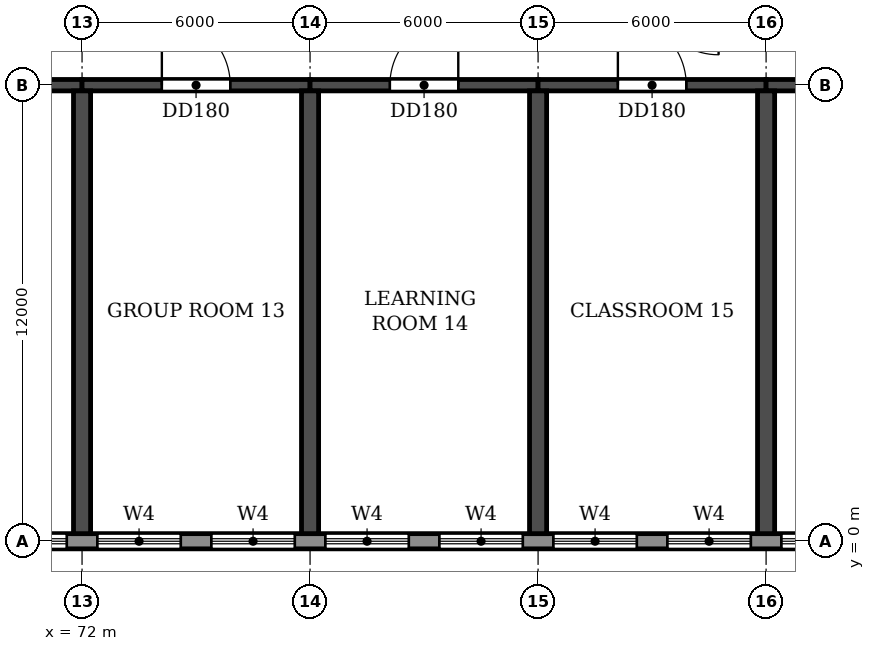
"""IFC4 building model, lengths in metres.
Left out: names, types, materials, properties, quantities, classifications, styles, units other than length and angle.
Written with IfcOpenShell. Run it as: python <this file> out.ifc"""

import sys

from ifc_helpers import new_model, si_unit, direction, frame, frame_2d, origin, place, context, subcontext, project, spatial, rectangle, extrude, element, fill, save


model = new_model("IFC4")
c1 = context("Model", 3, precision=1e-05, world=origin(), true_north=direction((0.0, 1.0)))
c2 = subcontext(c1, "Body", "Model", "MODEL_VIEW")
j1 = project(units=[si_unit("LENGTHUNIT", "METRE"), si_unit("PLANEANGLEUNIT", "RADIAN")], contexts=[c1])
p1 = place(None, origin())
s1 = spatial("IfcSite", under=j1, at=p1, CompositionType="ELEMENT")
p2 = place(p1, origin())
s2 = spatial("IfcBuilding", under=s1, at=p2, CompositionType="ELEMENT")
p3 = place(p2, frame((0.0, 0.0, 15.0)))
s3 = spatial("IfcBuildingStorey", under=s2, at=p3, CompositionType="ELEMENT", Elevation=15.0)
for number, where, z_axis, x_axis in (
    (1, (72.0, 0.2, 0.0), (0.0, 0.0, 1.0), (0.0, 1.0, 0.0)),
    (2, (78.0, 0.2, 0.0), (0.0, 0.0, 1.0), (0.0, 1.0, 0.0)),
    (3, (84.0, 0.2, 0.0), (0.0, 0.0, 1.0), (0.0, 1.0, 0.0)),
    (4, (90.0, 0.2, 0.0), (0.0, 0.0, 1.0), (0.0, 1.0, 0.0)),
):
    element("IfcWall", number, at=place(p3, frame(where, z_axis=z_axis, x_axis=x_axis)), inside=s3, PredefinedType="SHEAR", context=c2, shape_type="SweptSolid", body=[
        extrude(rectangle(XDim=11.65, YDim=0.45, at=frame_2d((5.825, 0.0))), origin(), (0.0, 0.0, 1.0), 3.92),
    ])
p4 = place(p3, frame((66.0, 12.0, 0.0), z_axis=(0.0, 0.0, 1.0), x_axis=(1.0, 0.0, 0.0)))
e5 = element("IfcWall", 5, at=p4, inside=s3, PredefinedType="SHEAR", context=c2, shape_type="SweptSolid", body=[
    extrude(rectangle(XDim=6.0, YDim=0.3, at=frame_2d((3.0, 0.0))), origin(), (0.0, 0.0, 1.0), 3.32),
])
p5 = place(p4, frame((2.1, 0.0, 0.0)))
e6 = element("IfcOpeningElement", 6, at=p5, cuts=e5, PredefinedType="OPENING", context=c2, shape_type="SweptSolid", body=[
    extrude(rectangle(XDim=1.8, YDim=2.1, at=frame_2d((0.9, 1.05))), frame((0.0, 0.16, 0.0), z_axis=(0.0, -1.0, 0.0), x_axis=(1.0, 0.0, 0.0)), (0.0, 0.0, 1.0), 0.32),
])
p6 = place(p3, frame((72.0, 12.0, 0.0), z_axis=(0.0, 0.0, 1.0), x_axis=(1.0, 0.0, 0.0)))
e7 = element("IfcWall", 7, at=p6, inside=s3, PredefinedType="SHEAR", context=c2, shape_type="SweptSolid", body=[
    extrude(rectangle(XDim=6.0, YDim=0.3, at=frame_2d((3.0, 0.0))), origin(), (0.0, 0.0, 1.0), 3.32),
])
p7 = place(p6, frame((2.1, 0.0, 0.0)))
e8 = element("IfcOpeningElement", 8, at=p7, cuts=e7, PredefinedType="OPENING", context=c2, shape_type="SweptSolid", body=[
    extrude(rectangle(XDim=1.8, YDim=2.1, at=frame_2d((0.9, 1.05))), frame((0.0, 0.16, 0.0), z_axis=(0.0, -1.0, 0.0), x_axis=(1.0, 0.0, 0.0)), (0.0, 0.0, 1.0), 0.32),
])
p8 = place(p3, frame((78.0, 12.0, 0.0), z_axis=(0.0, 0.0, 1.0), x_axis=(1.0, 0.0, 0.0)))
e9 = element("IfcWall", 9, at=p8, inside=s3, PredefinedType="SHEAR", context=c2, shape_type="SweptSolid", body=[
    extrude(rectangle(XDim=6.0, YDim=0.3, at=frame_2d((3.0, 0.0))), origin(), (0.0, 0.0, 1.0), 3.32),
])
p9 = place(p8, frame((2.1, 0.0, 0.0)))
e10 = element("IfcOpeningElement", 10, at=p9, cuts=e9, PredefinedType="OPENING", context=c2, shape_type="SweptSolid", body=[
    extrude(rectangle(XDim=1.8, YDim=2.1, at=frame_2d((0.9, 1.05))), frame((0.0, 0.16, 0.0), z_axis=(0.0, -1.0, 0.0), x_axis=(1.0, 0.0, 0.0)), (0.0, 0.0, 1.0), 0.32),
])
p10 = place(p3, frame((84.0, 12.0, 0.0), z_axis=(0.0, 0.0, 1.0), x_axis=(1.0, 0.0, 0.0)))
e11 = element("IfcWall", 11, at=p10, inside=s3, PredefinedType="SHEAR", context=c2, shape_type="SweptSolid", body=[
    extrude(rectangle(XDim=6.0, YDim=0.3, at=frame_2d((3.0, 0.0))), origin(), (0.0, 0.0, 1.0), 3.32),
])
p11 = place(p10, frame((2.1, 0.0, 0.0)))
e12 = element("IfcOpeningElement", 12, at=p11, cuts=e11, PredefinedType="OPENING", context=c2, shape_type="SweptSolid", body=[
    extrude(rectangle(XDim=1.8, YDim=2.1, at=frame_2d((0.9, 1.05))), frame((0.0, 0.16, 0.0), z_axis=(0.0, -1.0, 0.0), x_axis=(1.0, 0.0, 0.0)), (0.0, 0.0, 1.0), 0.32),
])
p12 = place(p3, frame((90.0, 12.0, 0.0), z_axis=(0.0, 0.0, 1.0), x_axis=(1.0, 0.0, 0.0)))
e13 = element("IfcWall", 13, at=p12, inside=s3, PredefinedType="SHEAR", context=c2, shape_type="SweptSolid", body=[
    extrude(rectangle(XDim=6.0, YDim=0.3, at=frame_2d((3.0, 0.0))), origin(), (0.0, 0.0, 1.0), 3.32),
])
p13 = place(p12, frame((2.1, 0.0, 0.0)))
e14 = element("IfcOpeningElement", 14, at=p13, cuts=e13, PredefinedType="OPENING", context=c2, shape_type="SweptSolid", body=[
    extrude(rectangle(XDim=1.8, YDim=2.1, at=frame_2d((0.9, 1.05))), frame((0.0, 0.16, 0.0), z_axis=(0.0, -1.0, 0.0), x_axis=(1.0, 0.0, 0.0)), (0.0, 0.0, 1.0), 0.32),
])
p14 = place(p3, frame((-3.0, 0.0, 0.0), z_axis=(0.0, 0.0, 1.0), x_axis=(1.0, 0.0, 0.0)))
e15 = element("IfcWall", 15, at=p14, inside=s3, PredefinedType="STANDARD", context=c2, shape_type="SweptSolid", body=[
    extrude(rectangle(XDim=108.0, YDim=0.4, at=frame_2d((54.0, 0.0))), origin(), (0.0, 0.0, 1.0), 3.92),
])
p15 = place(p14, frame((3.4, 0.0, 0.9)))
e16 = element("IfcOpeningElement", 16, at=p15, cuts=e15, PredefinedType="OPENING", context=c2, shape_type="SweptSolid", body=[
    extrude(rectangle(XDim=2.2, YDim=2.7, at=frame_2d((1.1, 1.35))), frame((0.0, 0.21, 0.0), z_axis=(0.0, -1.0, 0.0), x_axis=(1.0, 0.0, 0.0)), (0.0, 0.0, 1.0), 0.42),
])
p16 = place(p14, frame((6.4, 0.0, 0.9)))
e17 = element("IfcOpeningElement", 17, at=p16, cuts=e15, PredefinedType="OPENING", context=c2, shape_type="SweptSolid", body=[
    extrude(rectangle(XDim=2.2, YDim=2.7, at=frame_2d((1.1, 1.35))), frame((0.0, 0.21, 0.0), z_axis=(0.0, -1.0, 0.0), x_axis=(1.0, 0.0, 0.0)), (0.0, 0.0, 1.0), 0.42),
])
p17 = place(p14, frame((9.4, 0.0, 0.9)))
e18 = element("IfcOpeningElement", 18, at=p17, cuts=e15, PredefinedType="OPENING", context=c2, shape_type="SweptSolid", body=[
    extrude(rectangle(XDim=2.2, YDim=2.7, at=frame_2d((1.1, 1.35))), frame((0.0, 0.21, 0.0), z_axis=(0.0, -1.0, 0.0), x_axis=(1.0, 0.0, 0.0)), (0.0, 0.0, 1.0), 0.42),
])
p18 = place(p14, frame((12.4, 0.0, 0.9)))
e19 = element("IfcOpeningElement", 19, at=p18, cuts=e15, PredefinedType="OPENING", context=c2, shape_type="SweptSolid", body=[
    extrude(rectangle(XDim=2.2, YDim=2.7, at=frame_2d((1.1, 1.35))), frame((0.0, 0.21, 0.0), z_axis=(0.0, -1.0, 0.0), x_axis=(1.0, 0.0, 0.0)), (0.0, 0.0, 1.0), 0.42),
])
p19 = place(p14, frame((15.4, 0.0, 0.9)))
e20 = element("IfcOpeningElement", 20, at=p19, cuts=e15, PredefinedType="OPENING", context=c2, shape_type="SweptSolid", body=[
    extrude(rectangle(XDim=2.2, YDim=2.7, at=frame_2d((1.1, 1.35))), frame((0.0, 0.21, 0.0), z_axis=(0.0, -1.0, 0.0), x_axis=(1.0, 0.0, 0.0)), (0.0, 0.0, 1.0), 0.42),
])
p20 = place(p14, frame((18.4, 0.0, 0.9)))
e21 = element("IfcOpeningElement", 21, at=p20, cuts=e15, PredefinedType="OPENING", context=c2, shape_type="SweptSolid", body=[
    extrude(rectangle(XDim=2.2, YDim=2.7, at=frame_2d((1.1, 1.35))), frame((0.0, 0.21, 0.0), z_axis=(0.0, -1.0, 0.0), x_axis=(1.0, 0.0, 0.0)), (0.0, 0.0, 1.0), 0.42),
])
p21 = place(p14, frame((21.4, 0.0, 0.9)))
e22 = element("IfcOpeningElement", 22, at=p21, cuts=e15, PredefinedType="OPENING", context=c2, shape_type="SweptSolid", body=[
    extrude(rectangle(XDim=2.2, YDim=2.7, at=frame_2d((1.1, 1.35))), frame((0.0, 0.21, 0.0), z_axis=(0.0, -1.0, 0.0), x_axis=(1.0, 0.0, 0.0)), (0.0, 0.0, 1.0), 0.42),
])
p22 = place(p14, frame((24.4, 0.0, 0.9)))
e23 = element("IfcOpeningElement", 23, at=p22, cuts=e15, PredefinedType="OPENING", context=c2, shape_type="SweptSolid", body=[
    extrude(rectangle(XDim=2.2, YDim=2.7, at=frame_2d((1.1, 1.35))), frame((0.0, 0.21, 0.0), z_axis=(0.0, -1.0, 0.0), x_axis=(1.0, 0.0, 0.0)), (0.0, 0.0, 1.0), 0.42),
])
p23 = place(p14, frame((27.4, 0.0, 0.9)))
e24 = element("IfcOpeningElement", 24, at=p23, cuts=e15, PredefinedType="OPENING", context=c2, shape_type="SweptSolid", body=[
    extrude(rectangle(XDim=2.2, YDim=2.7, at=frame_2d((1.1, 1.35))), frame((0.0, 0.21, 0.0), z_axis=(0.0, -1.0, 0.0), x_axis=(1.0, 0.0, 0.0)), (0.0, 0.0, 1.0), 0.42),
])
p24 = place(p14, frame((30.4, 0.0, 0.9)))
e25 = element("IfcOpeningElement", 25, at=p24, cuts=e15, PredefinedType="OPENING", context=c2, shape_type="SweptSolid", body=[
    extrude(rectangle(XDim=2.2, YDim=2.7, at=frame_2d((1.1, 1.35))), frame((0.0, 0.21, 0.0), z_axis=(0.0, -1.0, 0.0), x_axis=(1.0, 0.0, 0.0)), (0.0, 0.0, 1.0), 0.42),
])
p25 = place(p14, frame((33.4, 0.0, 0.9)))
e26 = element("IfcOpeningElement", 26, at=p25, cuts=e15, PredefinedType="OPENING", context=c2, shape_type="SweptSolid", body=[
    extrude(rectangle(XDim=2.2, YDim=2.7, at=frame_2d((1.1, 1.35))), frame((0.0, 0.21, 0.0), z_axis=(0.0, -1.0, 0.0), x_axis=(1.0, 0.0, 0.0)), (0.0, 0.0, 1.0), 0.42),
])
p26 = place(p14, frame((36.4, 0.0, 0.9)))
e27 = element("IfcOpeningElement", 27, at=p26, cuts=e15, PredefinedType="OPENING", context=c2, shape_type="SweptSolid", body=[
    extrude(rectangle(XDim=2.2, YDim=2.7, at=frame_2d((1.1, 1.35))), frame((0.0, 0.21, 0.0), z_axis=(0.0, -1.0, 0.0), x_axis=(1.0, 0.0, 0.0)), (0.0, 0.0, 1.0), 0.42),
])
p27 = place(p14, frame((39.4, 0.0, 0.9)))
e28 = element("IfcOpeningElement", 28, at=p27, cuts=e15, PredefinedType="OPENING", context=c2, shape_type="SweptSolid", body=[
    extrude(rectangle(XDim=2.2, YDim=2.7, at=frame_2d((1.1, 1.35))), frame((0.0, 0.21, 0.0), z_axis=(0.0, -1.0, 0.0), x_axis=(1.0, 0.0, 0.0)), (0.0, 0.0, 1.0), 0.42),
])
p28 = place(p14, frame((42.4, 0.0, 0.9)))
e29 = element("IfcOpeningElement", 29, at=p28, cuts=e15, PredefinedType="OPENING", context=c2, shape_type="SweptSolid", body=[
    extrude(rectangle(XDim=2.2, YDim=2.7, at=frame_2d((1.1, 1.35))), frame((0.0, 0.21, 0.0), z_axis=(0.0, -1.0, 0.0), x_axis=(1.0, 0.0, 0.0)), (0.0, 0.0, 1.0), 0.42),
])
p29 = place(p14, frame((45.4, 0.0, 0.9)))
e30 = element("IfcOpeningElement", 30, at=p29, cuts=e15, PredefinedType="OPENING", context=c2, shape_type="SweptSolid", body=[
    extrude(rectangle(XDim=2.2, YDim=2.7, at=frame_2d((1.1, 1.35))), frame((0.0, 0.21, 0.0), z_axis=(0.0, -1.0, 0.0), x_axis=(1.0, 0.0, 0.0)), (0.0, 0.0, 1.0), 0.42),
])
p30 = place(p14, frame((48.4, 0.0, 0.9)))
e31 = element("IfcOpeningElement", 31, at=p30, cuts=e15, PredefinedType="OPENING", context=c2, shape_type="SweptSolid", body=[
    extrude(rectangle(XDim=2.2, YDim=2.7, at=frame_2d((1.1, 1.35))), frame((0.0, 0.21, 0.0), z_axis=(0.0, -1.0, 0.0), x_axis=(1.0, 0.0, 0.0)), (0.0, 0.0, 1.0), 0.42),
])
p31 = place(p14, frame((51.4, 0.0, 0.9)))
e32 = element("IfcOpeningElement", 32, at=p31, cuts=e15, PredefinedType="OPENING", context=c2, shape_type="SweptSolid", body=[
    extrude(rectangle(XDim=2.2, YDim=2.7, at=frame_2d((1.1, 1.35))), frame((0.0, 0.21, 0.0), z_axis=(0.0, -1.0, 0.0), x_axis=(1.0, 0.0, 0.0)), (0.0, 0.0, 1.0), 0.42),
])
p32 = place(p14, frame((54.4, 0.0, 0.9)))
e33 = element("IfcOpeningElement", 33, at=p32, cuts=e15, PredefinedType="OPENING", context=c2, shape_type="SweptSolid", body=[
    extrude(rectangle(XDim=2.2, YDim=2.7, at=frame_2d((1.1, 1.35))), frame((0.0, 0.21, 0.0), z_axis=(0.0, -1.0, 0.0), x_axis=(1.0, 0.0, 0.0)), (0.0, 0.0, 1.0), 0.42),
])
p33 = place(p14, frame((57.4, 0.0, 0.9)))
e34 = element("IfcOpeningElement", 34, at=p33, cuts=e15, PredefinedType="OPENING", context=c2, shape_type="SweptSolid", body=[
    extrude(rectangle(XDim=2.2, YDim=2.7, at=frame_2d((1.1, 1.35))), frame((0.0, 0.21, 0.0), z_axis=(0.0, -1.0, 0.0), x_axis=(1.0, 0.0, 0.0)), (0.0, 0.0, 1.0), 0.42),
])
p34 = place(p14, frame((60.4, 0.0, 0.9)))
e35 = element("IfcOpeningElement", 35, at=p34, cuts=e15, PredefinedType="OPENING", context=c2, shape_type="SweptSolid", body=[
    extrude(rectangle(XDim=2.2, YDim=2.7, at=frame_2d((1.1, 1.35))), frame((0.0, 0.21, 0.0), z_axis=(0.0, -1.0, 0.0), x_axis=(1.0, 0.0, 0.0)), (0.0, 0.0, 1.0), 0.42),
])
p35 = place(p14, frame((63.4, 0.0, 0.9)))
e36 = element("IfcOpeningElement", 36, at=p35, cuts=e15, PredefinedType="OPENING", context=c2, shape_type="SweptSolid", body=[
    extrude(rectangle(XDim=2.2, YDim=2.7, at=frame_2d((1.1, 1.35))), frame((0.0, 0.21, 0.0), z_axis=(0.0, -1.0, 0.0), x_axis=(1.0, 0.0, 0.0)), (0.0, 0.0, 1.0), 0.42),
])
p36 = place(p14, frame((66.4, 0.0, 0.9)))
e37 = element("IfcOpeningElement", 37, at=p36, cuts=e15, PredefinedType="OPENING", context=c2, shape_type="SweptSolid", body=[
    extrude(rectangle(XDim=2.2, YDim=2.7, at=frame_2d((1.1, 1.35))), frame((0.0, 0.21, 0.0), z_axis=(0.0, -1.0, 0.0), x_axis=(1.0, 0.0, 0.0)), (0.0, 0.0, 1.0), 0.42),
])
p37 = place(p14, frame((69.4, 0.0, 0.9)))
e38 = element("IfcOpeningElement", 38, at=p37, cuts=e15, PredefinedType="OPENING", context=c2, shape_type="SweptSolid", body=[
    extrude(rectangle(XDim=2.2, YDim=2.7, at=frame_2d((1.1, 1.35))), frame((0.0, 0.21, 0.0), z_axis=(0.0, -1.0, 0.0), x_axis=(1.0, 0.0, 0.0)), (0.0, 0.0, 1.0), 0.42),
])
p38 = place(p14, frame((72.4, 0.0, 0.9)))
e39 = element("IfcOpeningElement", 39, at=p38, cuts=e15, PredefinedType="OPENING", context=c2, shape_type="SweptSolid", body=[
    extrude(rectangle(XDim=2.2, YDim=2.7, at=frame_2d((1.1, 1.35))), frame((0.0, 0.21, 0.0), z_axis=(0.0, -1.0, 0.0), x_axis=(1.0, 0.0, 0.0)), (0.0, 0.0, 1.0), 0.42),
])
p39 = place(p14, frame((75.4, 0.0, 0.9)))
e40 = element("IfcOpeningElement", 40, at=p39, cuts=e15, PredefinedType="OPENING", context=c2, shape_type="SweptSolid", body=[
    extrude(rectangle(XDim=2.2, YDim=2.7, at=frame_2d((1.1, 1.35))), frame((0.0, 0.21, 0.0), z_axis=(0.0, -1.0, 0.0), x_axis=(1.0, 0.0, 0.0)), (0.0, 0.0, 1.0), 0.42),
])
p40 = place(p14, frame((78.4, 0.0, 0.9)))
e41 = element("IfcOpeningElement", 41, at=p40, cuts=e15, PredefinedType="OPENING", context=c2, shape_type="SweptSolid", body=[
    extrude(rectangle(XDim=2.2, YDim=2.7, at=frame_2d((1.1, 1.35))), frame((0.0, 0.21, 0.0), z_axis=(0.0, -1.0, 0.0), x_axis=(1.0, 0.0, 0.0)), (0.0, 0.0, 1.0), 0.42),
])
p41 = place(p14, frame((81.4, 0.0, 0.9)))
e42 = element("IfcOpeningElement", 42, at=p41, cuts=e15, PredefinedType="OPENING", context=c2, shape_type="SweptSolid", body=[
    extrude(rectangle(XDim=2.2, YDim=2.7, at=frame_2d((1.1, 1.35))), frame((0.0, 0.21, 0.0), z_axis=(0.0, -1.0, 0.0), x_axis=(1.0, 0.0, 0.0)), (0.0, 0.0, 1.0), 0.42),
])
p42 = place(p14, frame((84.4, 0.0, 0.9)))
e43 = element("IfcOpeningElement", 43, at=p42, cuts=e15, PredefinedType="OPENING", context=c2, shape_type="SweptSolid", body=[
    extrude(rectangle(XDim=2.2, YDim=2.7, at=frame_2d((1.1, 1.35))), frame((0.0, 0.21, 0.0), z_axis=(0.0, -1.0, 0.0), x_axis=(1.0, 0.0, 0.0)), (0.0, 0.0, 1.0), 0.42),
])
p43 = place(p14, frame((87.4, 0.0, 0.9)))
e44 = element("IfcOpeningElement", 44, at=p43, cuts=e15, PredefinedType="OPENING", context=c2, shape_type="SweptSolid", body=[
    extrude(rectangle(XDim=2.2, YDim=2.7, at=frame_2d((1.1, 1.35))), frame((0.0, 0.21, 0.0), z_axis=(0.0, -1.0, 0.0), x_axis=(1.0, 0.0, 0.0)), (0.0, 0.0, 1.0), 0.42),
])
p44 = place(p14, frame((90.4, 0.0, 0.9)))
e45 = element("IfcOpeningElement", 45, at=p44, cuts=e15, PredefinedType="OPENING", context=c2, shape_type="SweptSolid", body=[
    extrude(rectangle(XDim=2.2, YDim=2.7, at=frame_2d((1.1, 1.35))), frame((0.0, 0.21, 0.0), z_axis=(0.0, -1.0, 0.0), x_axis=(1.0, 0.0, 0.0)), (0.0, 0.0, 1.0), 0.42),
])
p45 = place(p14, frame((93.4, 0.0, 0.9)))
e46 = element("IfcOpeningElement", 46, at=p45, cuts=e15, PredefinedType="OPENING", context=c2, shape_type="SweptSolid", body=[
    extrude(rectangle(XDim=2.2, YDim=2.7, at=frame_2d((1.1, 1.35))), frame((0.0, 0.21, 0.0), z_axis=(0.0, -1.0, 0.0), x_axis=(1.0, 0.0, 0.0)), (0.0, 0.0, 1.0), 0.42),
])
p46 = place(p14, frame((96.4, 0.0, 0.9)))
e47 = element("IfcOpeningElement", 47, at=p46, cuts=e15, PredefinedType="OPENING", context=c2, shape_type="SweptSolid", body=[
    extrude(rectangle(XDim=2.2, YDim=2.7, at=frame_2d((1.1, 1.35))), frame((0.0, 0.21, 0.0), z_axis=(0.0, -1.0, 0.0), x_axis=(1.0, 0.0, 0.0)), (0.0, 0.0, 1.0), 0.42),
])
p47 = place(p14, frame((99.4, 0.0, 0.9)))
e48 = element("IfcOpeningElement", 48, at=p47, cuts=e15, PredefinedType="OPENING", context=c2, shape_type="SweptSolid", body=[
    extrude(rectangle(XDim=2.2, YDim=2.7, at=frame_2d((1.1, 1.35))), frame((0.0, 0.21, 0.0), z_axis=(0.0, -1.0, 0.0), x_axis=(1.0, 0.0, 0.0)), (0.0, 0.0, 1.0), 0.42),
])
p48 = place(p14, frame((102.4, 0.0, 0.9)))
e49 = element("IfcOpeningElement", 49, at=p48, cuts=e15, PredefinedType="OPENING", context=c2, shape_type="SweptSolid", body=[
    extrude(rectangle(XDim=2.2, YDim=2.7, at=frame_2d((1.1, 1.35))), frame((0.0, 0.21, 0.0), z_axis=(0.0, -1.0, 0.0), x_axis=(1.0, 0.0, 0.0)), (0.0, 0.0, 1.0), 0.42),
])
p49 = place(p38, origin())
e50 = element("IfcWindow", 50, at=p49, inside=s3, PartitioningType="DOUBLE_PANEL_HORIZONTAL", PredefinedType="WINDOW", context=c2, shape_type="SweptSolid", body=[
    extrude(rectangle(XDim=2.2, YDim=2.7, at=frame_2d((1.1, 1.35))), frame((0.0, 0.03, 0.0), z_axis=(0.0, -1.0, 0.0), x_axis=(1.0, 0.0, 0.0)), (0.0, 0.0, 1.0), 0.06),
])
fill(e39, e50)
p50 = place(p39, origin())
e51 = element("IfcWindow", 51, at=p50, inside=s3, PartitioningType="DOUBLE_PANEL_HORIZONTAL", PredefinedType="WINDOW", context=c2, shape_type="SweptSolid", body=[
    extrude(rectangle(XDim=2.2, YDim=2.7, at=frame_2d((1.1, 1.35))), frame((0.0, 0.03, 0.0), z_axis=(0.0, -1.0, 0.0), x_axis=(1.0, 0.0, 0.0)), (0.0, 0.0, 1.0), 0.06),
])
fill(e40, e51)
p51 = place(p40, origin())
e52 = element("IfcWindow", 52, at=p51, inside=s3, PartitioningType="DOUBLE_PANEL_HORIZONTAL", PredefinedType="WINDOW", context=c2, shape_type="SweptSolid", body=[
    extrude(rectangle(XDim=2.2, YDim=2.7, at=frame_2d((1.1, 1.35))), frame((0.0, 0.03, 0.0), z_axis=(0.0, -1.0, 0.0), x_axis=(1.0, 0.0, 0.0)), (0.0, 0.0, 1.0), 0.06),
])
fill(e41, e52)
p52 = place(p41, origin())
e53 = element("IfcWindow", 53, at=p52, inside=s3, PartitioningType="DOUBLE_PANEL_HORIZONTAL", PredefinedType="WINDOW", context=c2, shape_type="SweptSolid", body=[
    extrude(rectangle(XDim=2.2, YDim=2.7, at=frame_2d((1.1, 1.35))), frame((0.0, 0.03, 0.0), z_axis=(0.0, -1.0, 0.0), x_axis=(1.0, 0.0, 0.0)), (0.0, 0.0, 1.0), 0.06),
])
fill(e42, e53)
p53 = place(p42, origin())
e54 = element("IfcWindow", 54, at=p53, inside=s3, PartitioningType="DOUBLE_PANEL_HORIZONTAL", PredefinedType="WINDOW", context=c2, shape_type="SweptSolid", body=[
    extrude(rectangle(XDim=2.2, YDim=2.7, at=frame_2d((1.1, 1.35))), frame((0.0, 0.03, 0.0), z_axis=(0.0, -1.0, 0.0), x_axis=(1.0, 0.0, 0.0)), (0.0, 0.0, 1.0), 0.06),
])
fill(e43, e54)
p54 = place(p43, origin())
e55 = element("IfcWindow", 55, at=p54, inside=s3, PartitioningType="DOUBLE_PANEL_HORIZONTAL", PredefinedType="WINDOW", context=c2, shape_type="SweptSolid", body=[
    extrude(rectangle(XDim=2.2, YDim=2.7, at=frame_2d((1.1, 1.35))), frame((0.0, 0.03, 0.0), z_axis=(0.0, -1.0, 0.0), x_axis=(1.0, 0.0, 0.0)), (0.0, 0.0, 1.0), 0.06),
])
fill(e44, e55)
p55 = place(p44, origin())
e56 = element("IfcWindow", 56, at=p55, inside=s3, PartitioningType="DOUBLE_PANEL_HORIZONTAL", PredefinedType="WINDOW", context=c2, shape_type="SweptSolid", body=[
    extrude(rectangle(XDim=2.2, YDim=2.7, at=frame_2d((1.1, 1.35))), frame((0.0, 0.03, 0.0), z_axis=(0.0, -1.0, 0.0), x_axis=(1.0, 0.0, 0.0)), (0.0, 0.0, 1.0), 0.06),
])
fill(e45, e56)
p56 = place(p45, origin())
e57 = element("IfcWindow", 57, at=p56, inside=s3, PartitioningType="DOUBLE_PANEL_HORIZONTAL", PredefinedType="WINDOW", context=c2, shape_type="SweptSolid", body=[
    extrude(rectangle(XDim=2.2, YDim=2.7, at=frame_2d((1.1, 1.35))), frame((0.0, 0.03, 0.0), z_axis=(0.0, -1.0, 0.0), x_axis=(1.0, 0.0, 0.0)), (0.0, 0.0, 1.0), 0.06),
])
fill(e46, e57)
p57 = place(p7, origin())
e58 = element("IfcDoor", 58, at=p57, inside=s3, OperationType="DOUBLE_DOOR_SINGLE_SWING", PredefinedType="DOOR", context=c2, shape_type="SweptSolid", body=[
    extrude(rectangle(XDim=1.8, YDim=2.1, at=frame_2d((0.9, 1.05))), frame((0.0, 0.025, 0.0), z_axis=(0.0, -1.0, 0.0), x_axis=(1.0, 0.0, 0.0)), (0.0, 0.0, 1.0), 0.05),
])
fill(e8, e58)
p58 = place(p9, origin())
e59 = element("IfcDoor", 59, at=p58, inside=s3, OperationType="DOUBLE_DOOR_SINGLE_SWING", PredefinedType="DOOR", context=c2, shape_type="SweptSolid", body=[
    extrude(rectangle(XDim=1.8, YDim=2.1, at=frame_2d((0.9, 1.05))), frame((0.0, 0.025, 0.0), z_axis=(0.0, -1.0, 0.0), x_axis=(1.0, 0.0, 0.0)), (0.0, 0.0, 1.0), 0.05),
])
fill(e10, e59)
p59 = place(p11, origin())
e60 = element("IfcDoor", 60, at=p59, inside=s3, OperationType="DOUBLE_DOOR_SINGLE_SWING", PredefinedType="DOOR", context=c2, shape_type="SweptSolid", body=[
    extrude(rectangle(XDim=1.8, YDim=2.1, at=frame_2d((0.9, 1.05))), frame((0.0, 0.025, 0.0), z_axis=(0.0, -1.0, 0.0), x_axis=(1.0, 0.0, 0.0)), (0.0, 0.0, 1.0), 0.05),
])
fill(e12, e60)
save(model, sys.argv[1])
